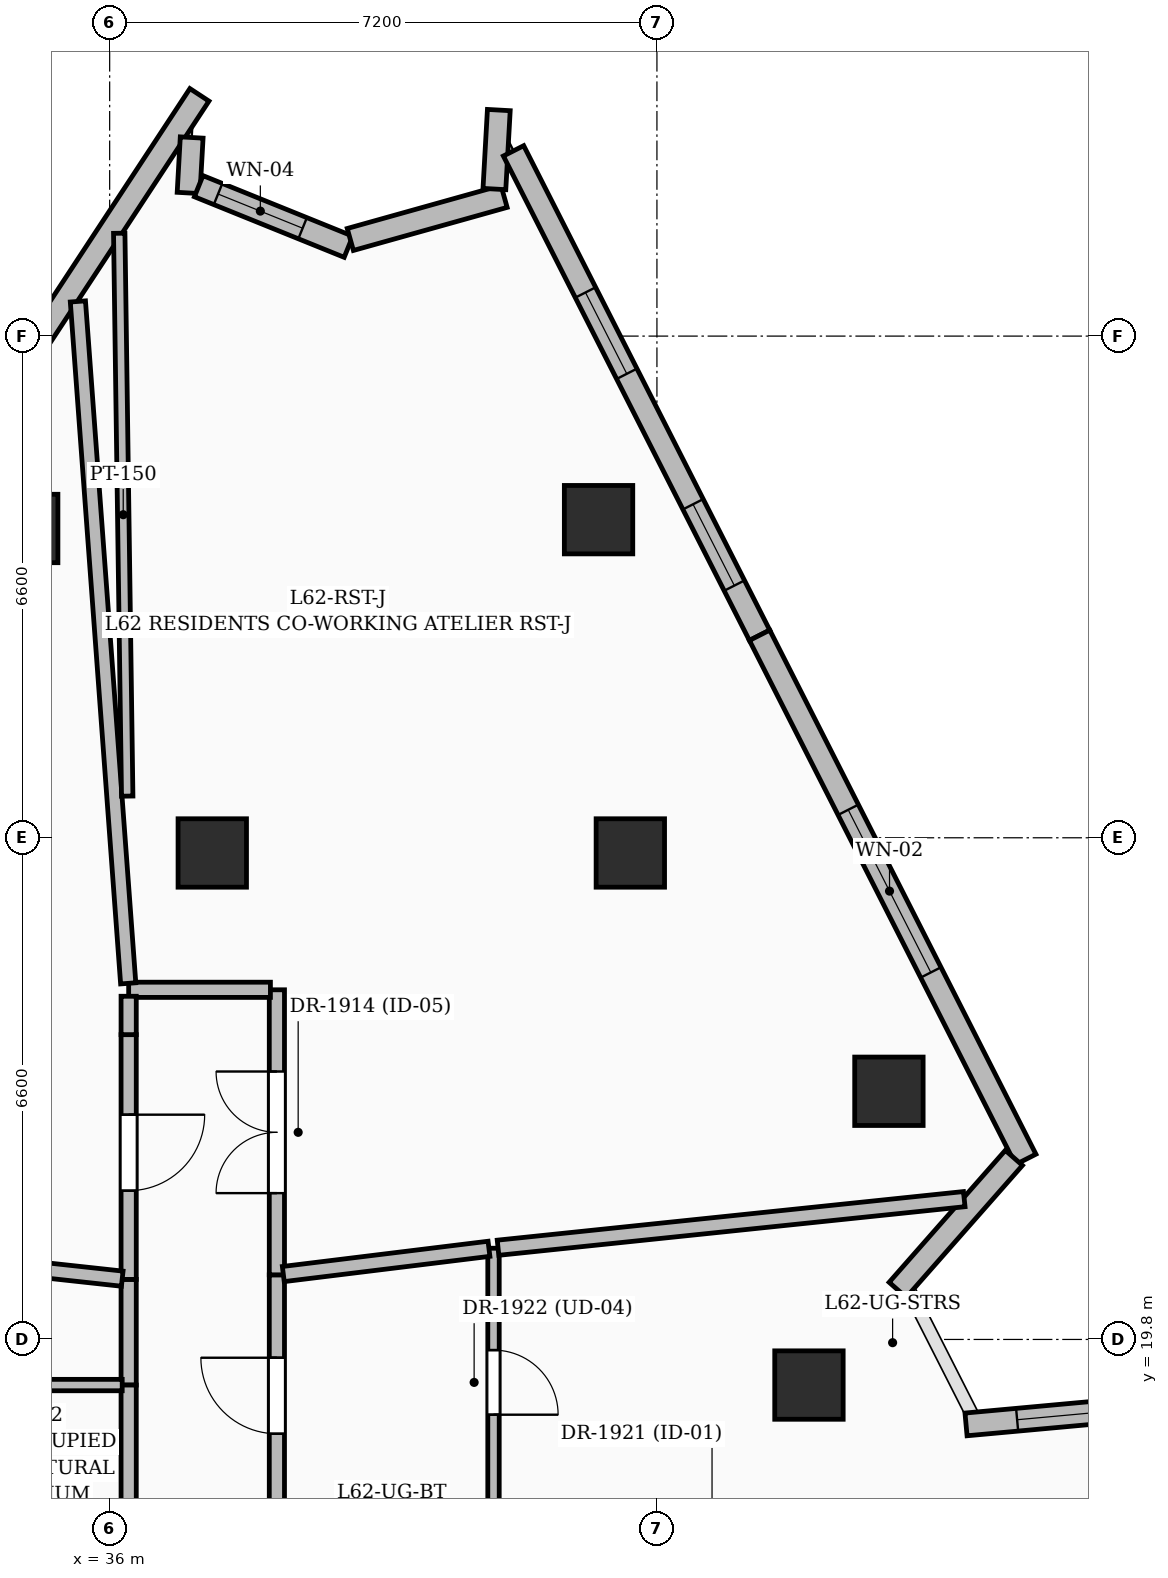
"""IFC4 building model, lengths in metres.
Left out: names, types, materials, properties, quantities, classifications, styles, units other than length and angle.
Written with IfcOpenShell. Run it as: python <this file> out.ifc"""

import sys

from ifc_helpers import new_model, si_unit, direction, frame, frame_2d, origin, origin_2d, place, context, subcontext, project, spatial, rectangle, extrude, element, fill, save


model = new_model("IFC4")
c1 = context("Model", 3, precision=1e-05, world=origin(), true_north=direction((0.0, 1.0)))
c2 = subcontext(c1, "Body", "Model", "MODEL_VIEW")
j1 = project(units=[si_unit("LENGTHUNIT", "METRE"), si_unit("PLANEANGLEUNIT", "RADIAN")], contexts=[c1])
p1 = place(None, origin())
s1 = spatial("IfcSite", under=j1, at=p1, CompositionType="ELEMENT")
p2 = place(p1, origin())
s2 = spatial("IfcBuilding", under=s1, at=p2, CompositionType="ELEMENT")
p3 = place(p2, frame((0.0, 0.0, 240.75)))
s3 = spatial("IfcBuildingStorey", under=s2, at=p3, CompositionType="ELEMENT", Elevation=240.75)
for number, where, z_axis, x_axis in (
    (1, (45.2, 19.2, 0.0), (0.0, 0.0, 1.0), (1.0, 0.0, 0.0)),
    (2, (42.85, 26.2, 0.0), (0.0, 0.0, 1.0), (1.0, 0.0, 0.0)),
    (3, (37.35, 26.2, 0.0), (0.0, 0.0, 1.0), (1.0, 0.0, 0.0)),
    (4, (46.252, 23.065, 0.0), (0.0, 0.0, 1.0), (1.0, 0.0, 0.0)),
    (5, (42.432, 30.585, 0.0), (0.0, 0.0, 1.0), (1.0, 0.0, 0.0)),
    (6, (34.869, 30.469, 0.0), (0.0, 0.0, 1.0), (1.0, 0.0, 0.0)),
):
    element("IfcColumn", number, at=place(p3, frame(where, z_axis=z_axis, x_axis=x_axis)), inside=s3, PredefinedType="COLUMN", context=c2, shape_type="SweptSolid", body=[
        extrude(rectangle(XDim=0.9, YDim=0.9, at=origin_2d()), origin(), (0.0, 0.0, 1.0), 3.75),
    ])
p4 = place(p3, frame((34.093, 31.473, 0.0), z_axis=(0.0, 0.0, 1.0), x_axis=(0.549058359685, 0.835784013762, 0.0)))
e7 = element("IfcWall", 7, at=p4, inside=s3, PredefinedType="SOLIDWALL", context=c2, shape_type="SweptSolid", body=[
    extrude(rectangle(XDim=5.625, YDim=0.3, at=frame_2d((2.812, 0.0))), origin(), (0.0, 0.0, 1.0), 3.5),
])
p5 = place(p3, frame((37.079, 35.613, 0.0), z_axis=(0.0, 0.0, 1.0), x_axis=(-0.056136239568, -0.998423118025, 0.0)))
e8 = element("IfcWall", 8, at=p5, inside=s3, PredefinedType="SOLIDWALL", context=c2, shape_type="SweptSolid", body=[
    extrude(rectangle(XDim=0.731, YDim=0.3, at=frame_2d((0.365, 0.0))), origin(), (0.0, 0.0, 1.0), 3.5),
])
p6 = place(p3, frame((37.171, 34.972, 0.0), z_axis=(0.0, 0.0, 1.0), x_axis=(0.927076098221, -0.37487318937, 0.0)))
e9 = element("IfcWall", 9, at=p6, inside=s3, PredefinedType="SOLIDWALL", context=c2, shape_type="SweptSolid", body=[
    extrude(rectangle(XDim=2.126, YDim=0.3, at=frame_2d((1.063, 0.0))), origin(), (0.0, 0.0, 1.0), 3.5),
])
p7 = place(p6, frame((0.275, 0.0, 0.8)))
e10 = element("IfcOpeningElement", 10, at=p7, cuts=e9, PredefinedType="OPENING", context=c2, shape_type="SweptSolid", body=[
    extrude(rectangle(XDim=1.2, YDim=1.8, at=frame_2d((0.6, 0.9))), frame((0.0, 0.16, 0.0), z_axis=(0.0, -1.0, 0.0), x_axis=(1.0, 0.0, 0.0)), (0.0, 0.0, 1.0), 0.32),
])
p8 = place(p3, frame((39.166, 34.271, 0.0), z_axis=(0.0, 0.0, 1.0), x_axis=(0.962897602702, 0.269867016714, 0.0)))
e11 = element("IfcWall", 11, at=p8, inside=s3, PredefinedType="SOLIDWALL", context=c2, shape_type="SweptSolid", body=[
    extrude(rectangle(XDim=2.101, YDim=0.3, at=frame_2d((1.05, 0.0))), origin(), (0.0, 0.0, 1.0), 3.5),
])
p9 = place(p3, frame((41.062, 34.935, 0.0), z_axis=(0.0, 0.0, 1.0), x_axis=(0.056067679965, 0.998426970421, 0.0)))
e12 = element("IfcWall", 12, at=p9, inside=s3, PredefinedType="SOLIDWALL", context=c2, shape_type="SweptSolid", body=[
    extrude(rectangle(XDim=1.041, YDim=0.3, at=frame_2d((0.521, 0.0))), origin(), (0.0, 0.0, 1.0), 3.5),
])
p10 = place(p3, frame((41.313, 35.437, 0.0), z_axis=(0.0, 0.0, 1.0), x_axis=(0.45284692617, -0.891588280238, 0.0)))
e13 = element("IfcWall", 13, at=p10, inside=s3, PredefinedType="SOLIDWALL", context=c2, shape_type="SweptSolid", body=[
    extrude(rectangle(XDim=7.148, YDim=0.3, at=frame_2d((3.574, 0.0))), origin(), (0.0, 0.0, 1.0), 3.5),
])
p11 = place(p10, frame((5.215, 0.0, 0.8)))
e14 = element("IfcOpeningElement", 14, at=p11, cuts=e13, PredefinedType="OPENING", context=c2, shape_type="SweptSolid", body=[
    extrude(rectangle(XDim=1.2, YDim=1.8, at=frame_2d((0.6, 0.9))), frame((0.0, 0.16, 0.0), z_axis=(0.0, -1.0, 0.0), x_axis=(1.0, 0.0, 0.0)), (0.0, 0.0, 1.0), 0.32),
])
p12 = place(p10, frame((2.09, 0.0, 0.8)))
e15 = element("IfcOpeningElement", 15, at=p12, cuts=e13, PredefinedType="OPENING", context=c2, shape_type="SweptSolid", body=[
    extrude(rectangle(XDim=1.2, YDim=1.8, at=frame_2d((0.6, 0.9))), frame((0.0, 0.16, 0.0), z_axis=(0.0, -1.0, 0.0), x_axis=(1.0, 0.0, 0.0)), (0.0, 0.0, 1.0), 0.32),
])
p13 = place(p3, frame((44.551, 29.064, 0.0), z_axis=(0.0, 0.0, 1.0), x_axis=(0.452849522817, -0.89158696137, 0.0)))
e16 = element("IfcWall", 16, at=p13, inside=s3, PredefinedType="SOLIDWALL", context=c2, shape_type="SweptSolid", body=[
    extrude(rectangle(XDim=7.733, YDim=0.3, at=frame_2d((3.867, 0.0))), origin(), (0.0, 0.0, 1.0), 3.5),
])
p14 = place(p13, frame((2.575, 0.0, 0.6)))
e17 = element("IfcOpeningElement", 17, at=p14, cuts=e16, PredefinedType="OPENING", context=c2, shape_type="SweptSolid", body=[
    extrude(rectangle(XDim=2.4, YDim=2.1, at=frame_2d((1.2, 1.05))), frame((0.0, 0.16, 0.0), z_axis=(0.0, -1.0, 0.0), x_axis=(1.0, 0.0, 0.0)), (0.0, 0.0, 1.0), 0.32),
])
p15 = place(p3, frame((47.896, 22.189, 0.0), z_axis=(0.0, 0.0, 1.0), x_axis=(-0.660944240616, -0.750435014373, 0.0)))
e18 = element("IfcWall", 18, at=p15, inside=s3, PredefinedType="SOLIDWALL", context=c2, shape_type="SweptSolid", body=[
    extrude(rectangle(XDim=2.313, YDim=0.3, at=frame_2d((1.157, 0.0))), origin(), (0.0, 0.0, 1.0), 2.825),
])
p16 = place(p3, frame((47.267, 18.682, 0.0), z_axis=(0.0, 0.0, 1.0), x_axis=(0.995834379581, 0.091180526676, 0.0)))
e19 = element("IfcWall", 19, at=p16, inside=s3, PredefinedType="SOLIDWALL", context=c2, shape_type="SweptSolid", body=[
    extrude(rectangle(XDim=2.594, YDim=0.3, at=frame_2d((1.297, 0.0))), origin(), (0.0, 0.0, 1.0), 2.825),
])
p17 = place(p16, frame((0.675, 0.0, 0.8)))
e20 = element("IfcOpeningElement", 20, at=p17, cuts=e19, PredefinedType="OPENING", context=c2, shape_type="SweptSolid", body=[
    extrude(rectangle(XDim=1.2, YDim=1.8, at=frame_2d((0.6, 0.9))), frame((0.0, 0.16, 0.0), z_axis=(0.0, -1.0, 0.0), x_axis=(1.0, 0.0, 0.0)), (0.0, 0.0, 1.0), 0.32),
])
p18 = place(p3, frame((36.25, 20.59, 0.0), z_axis=(0.0, 0.0, 1.0), x_axis=(0.0, -1.0, 0.0)))
e21 = element("IfcWall", 21, at=p18, inside=s3, PredefinedType="PARTITIONING", context=c2, shape_type="SweptSolid", body=[
    extrude(rectangle(XDim=1.39, YDim=0.2, at=frame_2d((0.695, 0.0))), origin(), (0.0, 0.0, 1.0), 3.5),
])
p19 = place(p3, frame((36.25, 19.2, 0.0), z_axis=(0.0, 0.0, 1.0), x_axis=(0.0, -1.0, 0.0)))
e22 = element("IfcWall", 22, at=p19, inside=s3, PredefinedType="PARTITIONING", context=c2, shape_type="SweptSolid", body=[
    extrude(rectangle(XDim=1.85, YDim=0.2, at=frame_2d((0.925, 0.0))), origin(), (0.0, 0.0, 1.0), 3.5),
])
p20 = place(p3, frame((38.2, 17.435, 0.0), z_axis=(0.0, 0.0, 1.0), x_axis=(0.0, 1.0, 0.0)))
e23 = element("IfcWall", 23, at=p20, inside=s3, PredefinedType="PARTITIONING", context=c2, shape_type="SweptSolid", body=[
    extrude(rectangle(XDim=3.215, YDim=0.2, at=frame_2d((1.607, 0.0))), origin(), (0.0, 0.0, 1.0), 3.5),
])
p21 = place(p20, frame((1.125, 0.0, 0.0)))
e24 = element("IfcOpeningElement", 24, at=p21, cuts=e23, PredefinedType="OPENING", context=c2, shape_type="SweptSolid", body=[
    extrude(rectangle(XDim=1.0, YDim=2.2, at=frame_2d((0.5, 1.1))), frame((0.0, 0.11, 0.0), z_axis=(0.0, -1.0, 0.0), x_axis=(1.0, 0.0, 0.0)), (0.0, 0.0, 1.0), 0.22),
])
p22 = place(p3, frame((36.25, 23.81, 0.0), z_axis=(0.0, 0.0, 1.0), x_axis=(0.0, -1.0, 0.0)))
e25 = element("IfcWall", 25, at=p22, inside=s3, PredefinedType="PARTITIONING", context=c2, shape_type="SweptSolid", body=[
    extrude(rectangle(XDim=3.22, YDim=0.2, at=frame_2d((1.61, 0.0))), origin(), (0.0, 0.0, 1.0), 2.685),
])
p23 = place(p22, frame((1.053, 0.0, 0.0)))
e26 = element("IfcOpeningElement", 26, at=p23, cuts=e25, PredefinedType="OPENING", context=c2, shape_type="SweptSolid", body=[
    extrude(rectangle(XDim=1.0, YDim=2.2, at=frame_2d((0.5, 1.1))), frame((0.0, 0.11, 0.0), z_axis=(0.0, -1.0, 0.0), x_axis=(1.0, 0.0, 0.0)), (0.0, 0.0, 1.0), 0.22),
])
p24 = place(p3, frame((38.2, 20.65, 0.0), z_axis=(0.0, 0.0, 1.0), x_axis=(0.0, 1.0, 0.0)))
e27 = element("IfcWall", 27, at=p24, inside=s3, PredefinedType="PARTITIONING", context=c2, shape_type="SweptSolid", body=[
    extrude(rectangle(XDim=3.75, YDim=0.2, at=frame_2d((1.875, 0.0))), origin(), (0.0, 0.0, 1.0), 3.5),
])
p25 = place(p24, frame((1.075, 0.0, 0.0)))
e28 = element("IfcOpeningElement", 28, at=p25, cuts=e27, PredefinedType="OPENING", context=c2, shape_type="SweptSolid", body=[
    extrude(rectangle(XDim=1.6, YDim=2.3, at=frame_2d((0.8, 1.15))), frame((0.0, 0.11, 0.0), z_axis=(0.0, -1.0, 0.0), x_axis=(1.0, 0.0, 0.0)), (0.0, 0.0, 1.0), 0.22),
])
p26 = place(p3, frame((38.115, 24.4, 0.0), z_axis=(0.0, 0.0, 1.0), x_axis=(-1.0, 0.0, 0.0)))
e29 = element("IfcWall", 29, at=p26, inside=s3, PredefinedType="PARTITIONING", context=c2, shape_type="SweptSolid", body=[
    extrude(rectangle(XDim=1.865, YDim=0.2, at=frame_2d((0.933, 0.0))), origin(), (0.0, 0.0, 1.0), 2.685),
])
p27 = place(p3, frame((34.24, 19.2, 0.0), z_axis=(0.0, 0.0, 1.0), x_axis=(1.0, 0.0, 0.0)))
e30 = element("IfcWall", 30, at=p27, inside=s3, PredefinedType="PARTITIONING", context=c2, shape_type="SweptSolid", body=[
    extrude(rectangle(XDim=1.925, YDim=0.15, at=frame_2d((0.962, 0.0))), origin(), (0.0, 0.0, 1.0), 3.5),
])
p28 = place(p3, frame((41.05, 21.0, 0.0), z_axis=(0.0, 0.0, 1.0), x_axis=(0.0, -1.0, 0.0)))
e31 = element("IfcWall", 31, at=p28, inside=s3, PredefinedType="PARTITIONING", context=c2, shape_type="SweptSolid", body=[
    extrude(rectangle(XDim=3.565, YDim=0.15, at=frame_2d((1.782, 0.0))), origin(), (0.0, 0.0, 1.0), 3.5),
])
p29 = place(p28, frame((1.34, 0.0, 0.0)))
e32 = element("IfcOpeningElement", 32, at=p29, cuts=e31, PredefinedType="OPENING", context=c2, shape_type="SweptSolid", body=[
    extrude(rectangle(XDim=0.85, YDim=2.1, at=frame_2d((0.425, 1.05))), frame((0.0, 0.085, 0.0), z_axis=(0.0, -1.0, 0.0), x_axis=(1.0, 0.0, 0.0)), (0.0, 0.0, 1.0), 0.17),
])
p30 = place(p3, frame((47.243, 21.646, 0.0), z_axis=(0.0, 0.0, 1.0), x_axis=(-0.994609735806, -0.10368931208, 0.0)))
e33 = element("IfcWall", 33, at=p30, inside=s3, PredefinedType="PARTITIONING", context=c2, shape_type="SweptSolid", body=[
    extrude(rectangle(XDim=6.167, YDim=0.2, at=frame_2d((3.083, 0.0))), origin(), (0.0, 0.0, 1.0), 2.685),
])
p31 = place(p3, frame((40.99, 20.993, 0.0), z_axis=(0.0, 0.0, 1.0), x_axis=(-0.992545545842, -0.121874277146, 0.0)))
e34 = element("IfcWall", 34, at=p31, inside=s3, PredefinedType="PARTITIONING", context=c2, shape_type="SweptSolid", body=[
    extrude(rectangle(XDim=2.726, YDim=0.2, at=frame_2d((1.363, 0.0))), origin(), (0.0, 0.0, 1.0), 3.5),
])
p32 = place(p3, frame((36.244, 24.485, 0.0), z_axis=(0.0, 0.0, 1.0), x_axis=(-0.073576769904, 0.997289556212, 0.0)))
e35 = element("IfcWall", 35, at=p32, inside=s3, PredefinedType="PARTITIONING", context=c2, shape_type="SweptSolid", body=[
    extrude(rectangle(XDim=8.996, YDim=0.2, at=frame_2d((4.498, 0.0))), origin(), (0.0, 0.0, 1.0), 2.685),
])
p33 = place(p3, frame((36.25, 24.315, 0.0), z_axis=(0.0, 0.0, 1.0), x_axis=(0.0, -1.0, 0.0)))
e36 = element("IfcWall", 36, at=p33, inside=s3, PredefinedType="PARTITIONING", context=c2, shape_type="SweptSolid", body=[
    extrude(rectangle(XDim=0.505, YDim=0.2, at=frame_2d((0.252, 0.0))), origin(), (0.0, 0.0, 1.0), 2.685),
])
p34 = place(p3, frame((36.166, 20.6, 0.0), z_axis=(0.0, 0.0, 1.0), x_axis=(-0.994123675756, 0.108250253122, 0.0)))
e37 = element("IfcWall", 37, at=p34, inside=s3, PredefinedType="PARTITIONING", context=c2, shape_type="SweptSolid", body=[
    extrude(rectangle(XDim=7.494, YDim=0.2, at=frame_2d((3.747, 0.0))), origin(), (0.0, 0.0, 1.0), 2.685),
])
p35 = place(p3, frame((36.231, 26.948, 0.0), z_axis=(0.0, 0.0, 1.0), x_axis=(-0.014175490249, 0.99989952269, 0.0)))
e38 = element("IfcWall", 38, at=p35, inside=s3, PredefinedType="PARTITIONING", context=c2, shape_type="SweptSolid", body=[
    extrude(rectangle(XDim=7.406, YDim=0.15, at=frame_2d((3.703, 0.0))), origin(), (0.0, 0.0, 1.0), 2.685),
])
p36 = place(p7, origin())
e39 = element("IfcWindow", 39, at=p36, inside=s3, PartitioningType="SINGLE_PANEL", PredefinedType="WINDOW", context=c2, shape_type="SweptSolid", body=[
    extrude(rectangle(XDim=1.2, YDim=1.8, at=frame_2d((0.6, 0.9))), frame((0.0, 0.03, 0.0), z_axis=(0.0, -1.0, 0.0), x_axis=(1.0, 0.0, 0.0)), (0.0, 0.0, 1.0), 0.06),
])
fill(e10, e39)
p37 = place(p11, origin())
e40 = element("IfcWindow", 40, at=p37, inside=s3, PartitioningType="SINGLE_PANEL", PredefinedType="WINDOW", context=c2, shape_type="SweptSolid", body=[
    extrude(rectangle(XDim=1.2, YDim=1.8, at=frame_2d((0.6, 0.9))), frame((0.0, 0.03, 0.0), z_axis=(0.0, -1.0, 0.0), x_axis=(1.0, 0.0, 0.0)), (0.0, 0.0, 1.0), 0.06),
])
fill(e14, e40)
p38 = place(p12, origin())
e41 = element("IfcWindow", 41, at=p38, inside=s3, PartitioningType="SINGLE_PANEL", PredefinedType="WINDOW", context=c2, shape_type="SweptSolid", body=[
    extrude(rectangle(XDim=1.2, YDim=1.8, at=frame_2d((0.6, 0.9))), frame((0.0, 0.03, 0.0), z_axis=(0.0, -1.0, 0.0), x_axis=(1.0, 0.0, 0.0)), (0.0, 0.0, 1.0), 0.06),
])
fill(e15, e41)
p39 = place(p14, origin())
e42 = element("IfcWindow", 42, at=p39, inside=s3, PartitioningType="SINGLE_PANEL", PredefinedType="WINDOW", context=c2, shape_type="SweptSolid", body=[
    extrude(rectangle(XDim=2.4, YDim=2.1, at=frame_2d((1.2, 1.05))), frame((0.0, 0.03, 0.0), z_axis=(0.0, -1.0, 0.0), x_axis=(1.0, 0.0, 0.0)), (0.0, 0.0, 1.0), 0.06),
])
fill(e17, e42)
p40 = place(p17, origin())
e43 = element("IfcWindow", 43, at=p40, inside=s3, PartitioningType="SINGLE_PANEL", PredefinedType="WINDOW", context=c2, shape_type="SweptSolid", body=[
    extrude(rectangle(XDim=1.2, YDim=1.8, at=frame_2d((0.6, 0.9))), frame((0.0, 0.03, 0.0), z_axis=(0.0, -1.0, 0.0), x_axis=(1.0, 0.0, 0.0)), (0.0, 0.0, 1.0), 0.06),
])
fill(e20, e43)
p41 = place(p25, origin())
e44 = element("IfcDoor", 44, at=p41, inside=s3, OperationType="DOUBLE_DOOR_SINGLE_SWING", PredefinedType="DOOR", context=c2, shape_type="SweptSolid", body=[
    extrude(rectangle(XDim=1.6, YDim=2.3, at=frame_2d((0.8, 1.15))), frame((0.0, 0.025, 0.0), z_axis=(0.0, -1.0, 0.0), x_axis=(1.0, 0.0, 0.0)), (0.0, 0.0, 1.0), 0.05),
])
fill(e28, e44)
p42 = place(p29, origin())
e45 = element("IfcDoor", 45, at=p42, inside=s3, OperationType="SINGLE_SWING_RIGHT", PredefinedType="DOOR", context=c2, shape_type="SweptSolid", body=[
    extrude(rectangle(XDim=0.85, YDim=2.1, at=frame_2d((0.425, 1.05))), frame((0.0, 0.025, 0.0), z_axis=(0.0, -1.0, 0.0), x_axis=(1.0, 0.0, 0.0)), (0.0, 0.0, 1.0), 0.05),
])
fill(e32, e45)
p43 = place(p23, origin())
e46 = element("IfcDoor", 46, at=p43, inside=s3, OperationType="SINGLE_SWING_LEFT", PredefinedType="DOOR", context=c2, shape_type="SweptSolid", body=[
    extrude(rectangle(XDim=1.0, YDim=2.2, at=frame_2d((0.5, 1.1))), frame((0.0, 0.025, 0.0), z_axis=(0.0, -1.0, 0.0), x_axis=(1.0, 0.0, 0.0)), (0.0, 0.0, 1.0), 0.05),
])
fill(e26, e46)
p44 = place(p21, origin())
e47 = element("IfcDoor", 47, at=p44, inside=s3, OperationType="SINGLE_SWING_RIGHT", PredefinedType="DOOR", context=c2, shape_type="SweptSolid", body=[
    extrude(rectangle(XDim=1.0, YDim=2.2, at=frame_2d((0.5, 1.1))), frame((0.0, 0.025, 0.0), z_axis=(0.0, -1.0, 0.0), x_axis=(1.0, 0.0, 0.0)), (0.0, 0.0, 1.0), 0.05),
])
fill(e24, e47)
save(model, sys.argv[1])
